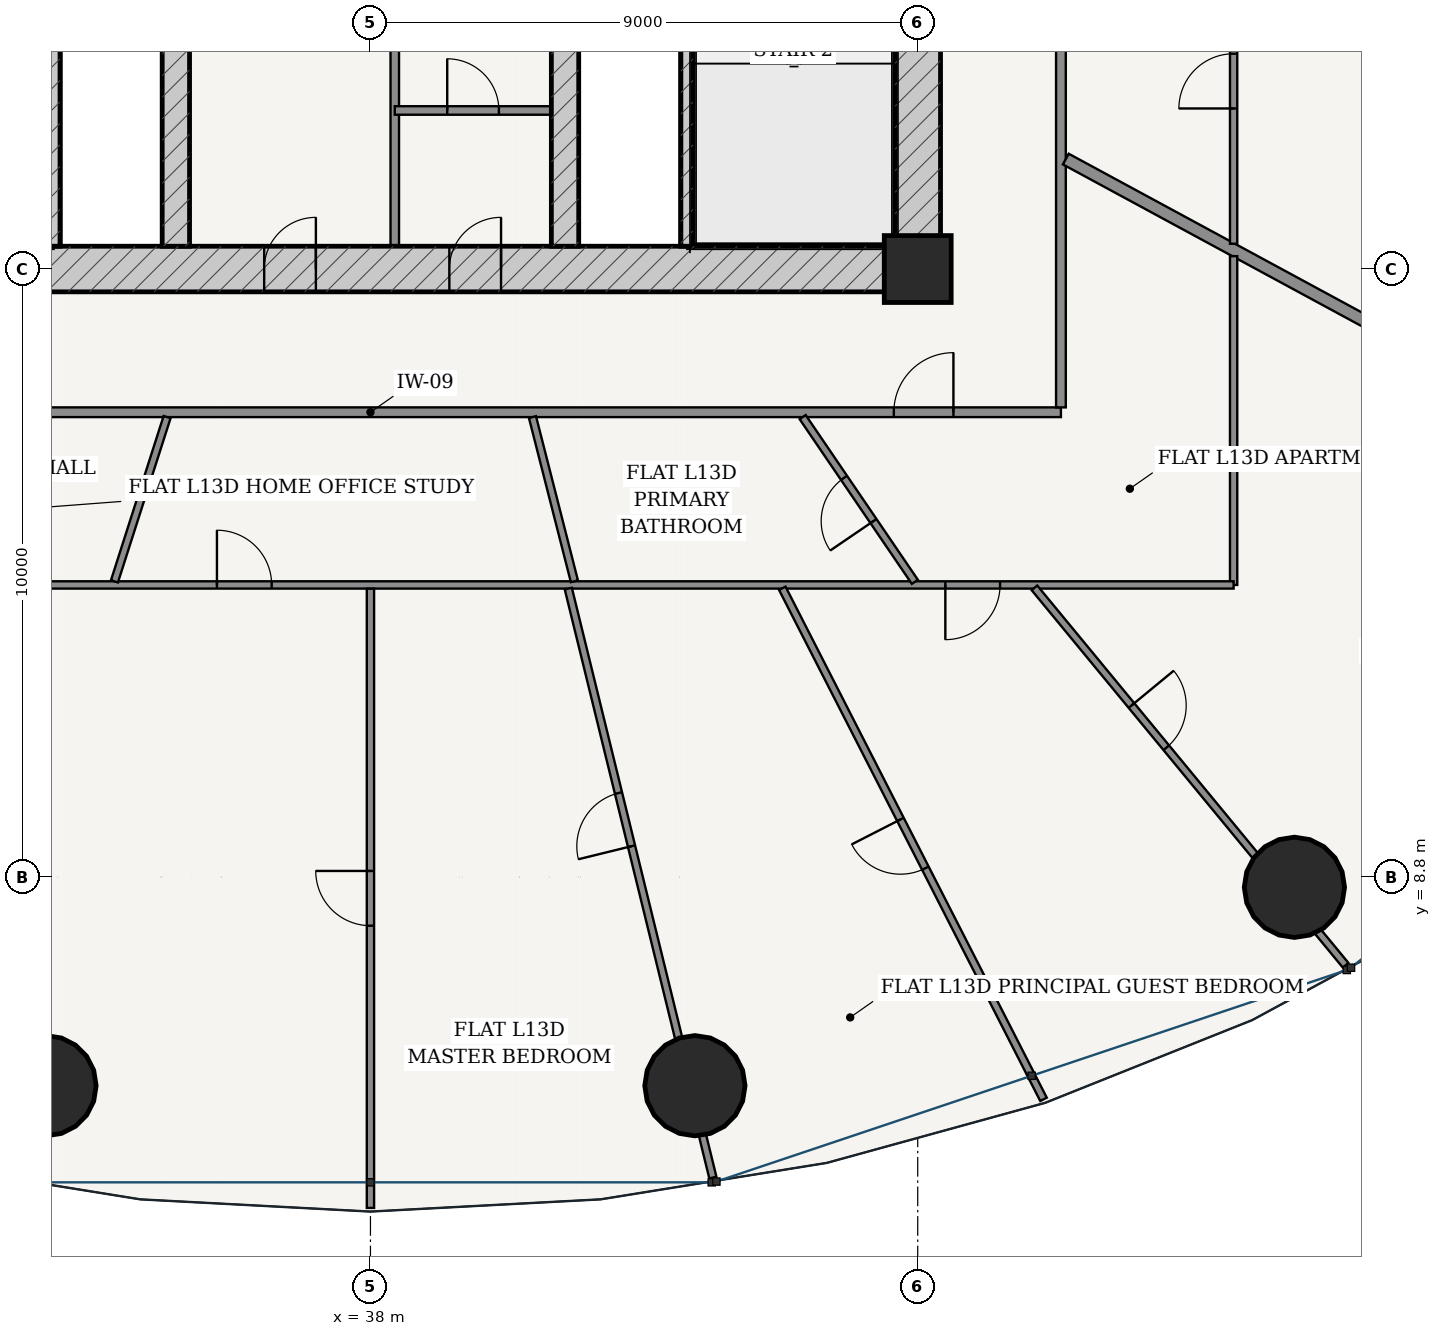
"""IFC4 building model, lengths in metres.
Left out: names, types, materials, properties, quantities, classifications, styles, units other than length and angle.
Written with IfcOpenShell. Run it as: python <this file> out.ifc"""

import sys

from ifc_helpers import new_model, si_unit, direction, frame, frame_2d, origin, origin_2d, place, context, subcontext, project, spatial, rectangle, hollow_circle, extrude, source, transform, mapped, element, fill, save


model = new_model("IFC4")
c1 = context("Model", 3, precision=1e-05, world=origin(), true_north=direction((-0.2419218956, 0.970295726276)))
c2 = subcontext(c1, "Body", "Model", "MODEL_VIEW")
j1 = project(units=[si_unit("LENGTHUNIT", "METRE"), si_unit("PLANEANGLEUNIT", "RADIAN")], contexts=[c1])
p1 = place(None, origin())
s1 = spatial("IfcSite", under=j1, at=p1, CompositionType="ELEMENT")
p2 = place(p1, origin())
s2 = spatial("IfcBuilding", under=s1, at=p2, CompositionType="ELEMENT")
p3 = place(p2, frame((0.0, 0.0, 52.8)))
s3 = spatial("IfcBuildingStorey", under=s2, at=p3, CompositionType="ELEMENT", Elevation=52.8)
p4 = place(p3, frame((47.0, 18.8, 0.0), z_axis=(0.0, 0.0, 1.0), x_axis=(1.0, 0.0, 0.0)))
e1 = element("IfcColumn", 1, at=p4, inside=s3, PredefinedType="COLUMN", context=c2, shape_type="SweptSolid", body=[
    extrude(rectangle(XDim=1.1, YDim=1.1, at=origin_2d()), origin(), (0.0, 0.0, 1.0), 3.6),
])
p5 = place(p3, frame((28.625, 18.8, 0.0), z_axis=(0.0, 0.0, 1.0), x_axis=(1.0, 0.0, 0.0)))
e2 = element("IfcWall", 2, at=p5, inside=s3, PredefinedType="SHEAR", context=c2, shape_type="SweptSolid", body=[
    extrude(rectangle(XDim=18.75, YDim=0.75, at=frame_2d((9.375, 0.0))), origin(), (0.0, 0.0, 1.0), 3.32),
])
p6 = place(p5, frame((7.627, 0.0, 0.0)))
e3 = element("IfcOpeningElement", 3, at=p6, cuts=e2, PredefinedType="OPENING", context=c2, shape_type="SweptSolid", body=[
    extrude(rectangle(XDim=0.85, YDim=2.1, at=frame_2d((0.425, 1.05))), frame((0.0, 0.385, 0.0), z_axis=(0.0, -1.0, 0.0), x_axis=(1.0, 0.0, 0.0)), (0.0, 0.0, 1.0), 0.77),
])
p7 = place(p5, frame((10.673, 0.0, 0.0)))
e4 = element("IfcOpeningElement", 4, at=p7, cuts=e2, PredefinedType="OPENING", context=c2, shape_type="SweptSolid", body=[
    extrude(rectangle(XDim=0.85, YDim=2.1, at=frame_2d((0.425, 1.05))), frame((0.0, 0.385, 0.0), z_axis=(0.0, -1.0, 0.0), x_axis=(1.0, 0.0, 0.0)), (0.0, 0.0, 1.0), 0.77),
])
p8 = place(p3, frame((47.0, 19.175, 0.0), z_axis=(0.0, 0.0, 1.0), x_axis=(0.0, 1.0, 0.0)))
e5 = element("IfcWall", 5, at=p8, inside=s3, PredefinedType="SHEAR", context=c2, shape_type="SweptSolid", body=[
    extrude(rectangle(XDim=15.25, YDim=0.75, at=frame_2d((7.625, 0.0))), origin(), (0.0, 0.0, 1.0), 3.32),
])
p9 = place(p8, frame((9.875, 0.0, 0.0)))
e6 = element("IfcOpeningElement", 6, at=p9, cuts=e5, PredefinedType="OPENING", context=c2, shape_type="SweptSolid", body=[
    extrude(rectangle(XDim=1.5, YDim=2.2, at=frame_2d((0.75, 1.1))), frame((0.0, 0.385, 0.0), z_axis=(0.0, -1.0, 0.0), x_axis=(1.0, 0.0, 0.0)), (0.0, 0.0, 1.0), 0.77),
])
for number, where, z_axis, x_axis in (
    (7, (32.795, 19.175, 0.0), (0.0, 0.0, 1.0), (0.0, 1.0, 0.0)),
    (8, (43.205, 19.175, 0.0), (0.0, 0.0, 1.0), (0.0, 1.0, 0.0)),
):
    element("IfcWall", number, at=place(p3, frame(where, z_axis=z_axis, x_axis=x_axis)), inside=s3, PredefinedType="SOLIDWALL", context=c2, shape_type="SweptSolid", body=[
        extrude(rectangle(XDim=7.375, YDim=0.2, at=frame_2d((3.688, 0.0))), origin(), (0.0, 0.0, 1.0), 3.32),
    ])
p10 = place(p3, frame((34.8, 19.175, 0.0), z_axis=(0.0, 0.0, 1.0), x_axis=(0.0, 1.0, 0.0)))
e9 = element("IfcWall", 9, at=p10, inside=s3, PredefinedType="SHEAR", context=c2, shape_type="SweptSolid", body=[
    extrude(rectangle(XDim=15.25, YDim=0.45, at=frame_2d((7.625, 0.0))), origin(), (0.0, 0.0, 1.0), 3.32),
])
p11 = place(p10, frame((7.8, 0.0, 0.0)))
e10 = element("IfcOpeningElement", 10, at=p11, cuts=e9, PredefinedType="OPENING", context=c2, shape_type="SweptSolid", body=[
    extrude(rectangle(XDim=1.05, YDim=2.15, at=frame_2d((0.525, 1.075))), frame((0.0, 0.235, 0.0), z_axis=(0.0, -1.0, 0.0), x_axis=(1.0, 0.0, 0.0)), (0.0, 0.0, 1.0), 0.47),
])
p12 = place(p3, frame((41.2, 19.175, 0.0), z_axis=(0.0, 0.0, 1.0), x_axis=(0.0, 1.0, 0.0)))
e11 = element("IfcWall", 11, at=p12, inside=s3, PredefinedType="SHEAR", context=c2, shape_type="SweptSolid", body=[
    extrude(rectangle(XDim=15.25, YDim=0.45, at=frame_2d((7.625, 0.0))), origin(), (0.0, 0.0, 1.0), 3.32),
])
p13 = place(p12, frame((7.8, 0.0, 0.0)))
e12 = element("IfcOpeningElement", 12, at=p13, cuts=e11, PredefinedType="OPENING", context=c2, shape_type="SweptSolid", body=[
    extrude(rectangle(XDim=1.05, YDim=2.15, at=frame_2d((0.525, 1.075))), frame((0.0, 0.235, 0.0), z_axis=(0.0, -1.0, 0.0), x_axis=(1.0, 0.0, 0.0)), (0.0, 0.0, 1.0), 0.47),
])
for number, where, z_axis, x_axis in (
    (13, (32.664, 5.37, 0.0), (0.0, 0.0, 1.0), (1.0, 0.0, 0.0)),
    (14, (43.336, 5.37, 0.0), (0.0, 0.0, 1.0), (1.0, 0.0, 0.0)),
    (15, (53.195, 8.632, 0.0), (0.0, 0.0, 1.0), (1.0, 0.0, 0.0)),
):
    element("IfcColumn", number, at=place(p3, frame(where, z_axis=z_axis, x_axis=x_axis)), inside=s3, PredefinedType="COLUMN", context=c2, shape_type="SweptSolid", body=[
        extrude(hollow_circle(Radius=0.825, WallThickness=0.05, at=origin_2d()), origin(), (0.0, 0.0, 1.0), 3.6),
    ])
p14 = place(p3, frame((38.4, 19.175, 0.0), z_axis=(0.0, 0.0, 1.0), x_axis=(0.0, 1.0, 0.0)))
e16 = element("IfcWall", 16, at=p14, inside=s3, PredefinedType="PARTITIONING", context=c2, shape_type="SweptSolid", body=[
    extrude(rectangle(XDim=4.465, YDim=0.14, at=frame_2d((2.232, 0.0))), origin(), (0.0, 0.0, 1.0), 3.32),
])
p15 = place(p3, frame((38.4, 21.407, 0.0), z_axis=(0.0, 0.0, 1.0), x_axis=(1.0, 0.0, 0.0)))
e17 = element("IfcWall", 17, at=p15, inside=s3, PredefinedType="PARTITIONING", context=c2, shape_type="SweptSolid", body=[
    extrude(rectangle(XDim=2.575, YDim=0.14, at=frame_2d((1.288, 0.0))), origin(), (0.0, 0.0, 1.0), 3.32),
])
p16 = place(p15, frame((0.863, 0.0, 0.0)))
e18 = element("IfcOpeningElement", 18, at=p16, cuts=e17, PredefinedType="OPENING", context=c2, shape_type="SweptSolid", body=[
    extrude(rectangle(XDim=0.85, YDim=2.1, at=frame_2d((0.425, 1.05))), frame((0.0, 0.08, 0.0), z_axis=(0.0, -1.0, 0.0), x_axis=(1.0, 0.0, 0.0)), (0.0, 0.0, 1.0), 0.16),
])
p17 = place(p3, frame((26.645, 16.445, 0.0), z_axis=(0.0, 0.0, 1.0), x_axis=(1.0, 0.0, 0.0)))
e19 = element("IfcWall", 19, at=p17, inside=s3, PredefinedType="PARTITIONING", context=c2, shape_type="SweptSolid", body=[
    extrude(rectangle(XDim=22.71, YDim=0.16, at=frame_2d((11.355, 0.0))), origin(), (0.0, 0.0, 1.0), 2.688),
])
p18 = place(p17, frame((19.962, 0.0, 0.0)))
e20 = element("IfcOpeningElement", 20, at=p18, cuts=e19, PredefinedType="OPENING", context=c2, shape_type="SweptSolid", body=[
    extrude(rectangle(XDim=0.98, YDim=2.2, at=frame_2d((0.49, 1.1))), frame((0.0, 0.09, 0.0), z_axis=(0.0, -1.0, 0.0), x_axis=(1.0, 0.0, 0.0)), (0.0, 0.0, 1.0), 0.18),
])
p19 = place(p3, frame((49.355, 16.525, 0.0), z_axis=(0.0, 0.0, 1.0), x_axis=(0.0, 1.0, 0.0)))
e21 = element("IfcWall", 21, at=p19, inside=s3, PredefinedType="PARTITIONING", context=c2, shape_type="SweptSolid", body=[
    extrude(rectangle(XDim=20.55, YDim=0.16, at=frame_2d((10.275, 0.0))), origin(), (0.0, 0.0, 1.0), 2.688),
])
p20 = place(p3, frame((49.435, 20.608, 0.0), z_axis=(0.0, 0.0, 1.0), x_axis=(0.879369737803, -0.476139542819, 0.0)))
e22 = element("IfcWall", 22, at=p20, inside=s3, PredefinedType="PARTITIONING", context=c2, shape_type="SweptSolid", body=[
    extrude(rectangle(XDim=14.295, YDim=0.2, at=frame_2d((7.147, 0.0))), origin(), (0.0, 0.0, 1.0), 2.688),
])
p21 = place(p3, frame((52.195, 39.995, 0.0), z_axis=(0.0, 0.0, 1.0), x_axis=(0.0, -1.0, 0.0)))
e23 = element("IfcWall", 23, at=p21, inside=s3, PredefinedType="PARTITIONING", context=c2, shape_type="SweptSolid", body=[
    extrude(rectangle(XDim=20.779, YDim=0.12, at=frame_2d((10.39, 0.0))), origin(), (0.0, 0.0, 1.0), 2.688),
])
p22 = place(p21, frame((13.944, 0.0, 0.0)))
e24 = element("IfcOpeningElement", 24, at=p22, cuts=e23, PredefinedType="OPENING", context=c2, shape_type="SweptSolid", body=[
    extrude(rectangle(XDim=0.9, YDim=2.15, at=frame_2d((0.45, 1.075))), frame((0.0, 0.07, 0.0), z_axis=(0.0, -1.0, 0.0), x_axis=(1.0, 0.0, 0.0)), (0.0, 0.0, 1.0), 0.14),
])
p23 = place(p21, frame((17.655, 0.0, 0.0)))
e25 = element("IfcOpeningElement", 25, at=p23, cuts=e23, PredefinedType="OPENING", context=c2, shape_type="SweptSolid", body=[
    extrude(rectangle(XDim=0.9, YDim=2.15, at=frame_2d((0.45, 1.075))), frame((0.0, 0.07, 0.0), z_axis=(0.0, -1.0, 0.0), x_axis=(1.0, 0.0, 0.0)), (0.0, 0.0, 1.0), 0.14),
])
p24 = place(p3, frame((52.195, 19.012, 0.0), z_axis=(0.0, 0.0, 1.0), x_axis=(0.0, -1.0, 0.0)))
e26 = element("IfcWall", 26, at=p24, inside=s3, PredefinedType="PARTITIONING", context=c2, shape_type="SweptSolid", body=[
    extrude(rectangle(XDim=5.407, YDim=0.12, at=frame_2d((2.704, 0.0))), origin(), (0.0, 0.0, 1.0), 2.999),
])
p25 = place(p3, frame((52.195, 13.605, 0.0), z_axis=(0.0, 0.0, 1.0), x_axis=(-1.0, 0.0, 0.0)))
e27 = element("IfcWall", 27, at=p25, inside=s3, PredefinedType="PARTITIONING", context=c2, shape_type="SweptSolid", body=[
    extrude(rectangle(XDim=24.973, YDim=0.12, at=frame_2d((12.487, 0.0))), origin(), (0.0, 0.0, 1.0), 2.688),
])
p26 = place(p25, frame((3.841, 0.0, 0.0)))
e28 = element("IfcOpeningElement", 28, at=p26, cuts=e27, PredefinedType="OPENING", context=c2, shape_type="SweptSolid", body=[
    extrude(rectangle(XDim=0.9, YDim=2.15, at=frame_2d((0.45, 1.075))), frame((0.0, 0.07, 0.0), z_axis=(0.0, -1.0, 0.0), x_axis=(1.0, 0.0, 0.0)), (0.0, 0.0, 1.0), 0.14),
])
p27 = place(p25, frame((15.819, 0.0, 0.0)))
e29 = element("IfcOpeningElement", 29, at=p27, cuts=e27, PredefinedType="OPENING", context=c2, shape_type="SweptSolid", body=[
    extrude(rectangle(XDim=0.9, YDim=2.15, at=frame_2d((0.45, 1.075))), frame((0.0, 0.07, 0.0), z_axis=(0.0, -1.0, 0.0), x_axis=(1.0, 0.0, 0.0)), (0.0, 0.0, 1.0), 0.14),
])
p28 = place(p25, frame((21.123, 0.0, 0.0)))
e30 = element("IfcOpeningElement", 30, at=p28, cuts=e27, PredefinedType="OPENING", context=c2, shape_type="SweptSolid", body=[
    extrude(rectangle(XDim=0.9, YDim=2.15, at=frame_2d((0.45, 1.075))), frame((0.0, 0.07, 0.0), z_axis=(0.0, -1.0, 0.0), x_axis=(1.0, 0.0, 0.0)), (0.0, 0.0, 1.0), 0.14),
])
p29 = place(p3, frame((38.0, 13.543, 0.0), z_axis=(0.0, 0.0, 1.0), x_axis=(0.0, -1.0, 0.0)))
e31 = element("IfcWall", 31, at=p29, inside=s3, PredefinedType="PARTITIONING", context=c2, shape_type="SweptSolid", body=[
    extrude(rectangle(XDim=10.183, YDim=0.12, at=frame_2d((5.091, 0.0))), origin(), (0.0, 0.0, 1.0), 2.762),
])
p30 = place(p29, frame((4.642, 0.0, 0.0)))
e32 = element("IfcOpeningElement", 32, at=p30, cuts=e31, PredefinedType="OPENING", context=c2, shape_type="SweptSolid", body=[
    extrude(rectangle(XDim=0.9, YDim=2.15, at=frame_2d((0.45, 1.075))), frame((0.0, 0.07, 0.0), z_axis=(0.0, -1.0, 0.0), x_axis=(1.0, 0.0, 0.0)), (0.0, 0.0, 1.0), 0.14),
])
p31 = place(p3, frame((41.254, 13.545, 0.0), z_axis=(0.0, 0.0, 1.0), x_axis=(0.238391877067, -0.971169044476, 0.0)))
e33 = element("IfcWall", 33, at=p31, inside=s3, PredefinedType="PARTITIONING", context=c2, shape_type="SweptSolid", body=[
    extrude(rectangle(XDim=9.973, YDim=0.12, at=frame_2d((4.986, 0.0))), origin(), (0.0, 0.0, 1.0), 2.688),
])
p32 = place(p31, frame((3.462, 0.0, 0.0)))
e34 = element("IfcOpeningElement", 34, at=p32, cuts=e33, PredefinedType="OPENING", context=c2, shape_type="SweptSolid", body=[
    extrude(rectangle(XDim=0.9, YDim=2.15, at=frame_2d((0.45, 1.075))), frame((0.0, 0.07, 0.0), z_axis=(0.0, -1.0, 0.0), x_axis=(1.0, 0.0, 0.0)), (0.0, 0.0, 1.0), 0.14),
])
p33 = place(p3, frame((44.773, 13.55, 0.0), z_axis=(0.0, 0.0, 1.0), x_axis=(0.455131567849, -0.890424200001, 0.0)))
e35 = element("IfcWall", 35, at=p33, inside=s3, PredefinedType="PARTITIONING", context=c2, shape_type="SweptSolid", body=[
    extrude(rectangle(XDim=9.439, YDim=0.12, at=frame_2d((4.719, 0.0))), origin(), (0.0, 0.0, 1.0), 2.762),
])
p34 = place(p33, frame((4.269, 0.0, 0.0)))
e36 = element("IfcOpeningElement", 36, at=p34, cuts=e35, PredefinedType="OPENING", context=c2, shape_type="SweptSolid", body=[
    extrude(rectangle(XDim=0.9, YDim=2.15, at=frame_2d((0.45, 1.075))), frame((0.0, 0.07, 0.0), z_axis=(0.0, -1.0, 0.0), x_axis=(1.0, 0.0, 0.0)), (0.0, 0.0, 1.0), 0.14),
])
p35 = place(p3, frame((48.919, 13.557, 0.0), z_axis=(0.0, 0.0, 1.0), x_axis=(0.636193310573, -0.771529695852, 0.0)))
e37 = element("IfcWall", 37, at=p35, inside=s3, PredefinedType="PARTITIONING", context=c2, shape_type="SweptSolid", body=[
    extrude(rectangle(XDim=8.044, YDim=0.12, at=frame_2d((4.022, 0.0))), origin(), (0.0, 0.0, 1.0), 2.688),
])
p36 = place(p35, frame((2.508, 0.0, 0.0)))
e38 = element("IfcOpeningElement", 38, at=p36, cuts=e37, PredefinedType="OPENING", context=c2, shape_type="SweptSolid", body=[
    extrude(rectangle(XDim=0.9, YDim=2.15, at=frame_2d((0.45, 1.075))), frame((0.0, 0.07, 0.0), z_axis=(0.0, -1.0, 0.0), x_axis=(1.0, 0.0, 0.0)), (0.0, 0.0, 1.0), 0.14),
])
p37 = place(p3, frame((34.656, 16.365, 0.0), z_axis=(0.0, 0.0, 1.0), x_axis=(-0.305153630579, -0.952303135427, 0.0)))
e39 = element("IfcWall", 39, at=p37, inside=s3, PredefinedType="PARTITIONING", context=c2, shape_type="SweptSolid", body=[
    extrude(rectangle(XDim=2.836, YDim=0.12, at=frame_2d((1.418, 0.0))), origin(), (0.0, 0.0, 1.0), 3.32),
])
p38 = place(p3, frame((40.665, 16.365, 0.0), z_axis=(0.0, 0.0, 1.0), x_axis=(0.2474182455, -0.968908773721, 0.0)))
e40 = element("IfcWall", 40, at=p38, inside=s3, PredefinedType="PARTITIONING", context=c2, shape_type="SweptSolid", body=[
    extrude(rectangle(XDim=2.787, YDim=0.12, at=frame_2d((1.393, 0.0))), origin(), (0.0, 0.0, 1.0), 2.688),
])
p39 = place(p3, frame((45.108, 16.365, 0.0), z_axis=(0.0, 0.0, 1.0), x_axis=(0.562992379509, -0.826462086617, 0.0)))
e41 = element("IfcWall", 41, at=p39, inside=s3, PredefinedType="PARTITIONING", context=c2, shape_type="SweptSolid", body=[
    extrude(rectangle(XDim=3.278, YDim=0.12, at=frame_2d((1.639, 0.0))), origin(), (0.0, 0.0, 1.0), 3.32),
])
p40 = place(p39, frame((1.209, 0.0, 0.0)))
e42 = element("IfcOpeningElement", 42, at=p40, cuts=e41, PredefinedType="OPENING", context=c2, shape_type="SweptSolid", body=[
    extrude(rectangle(XDim=0.86, YDim=2.15, at=frame_2d((0.43, 1.075))), frame((0.0, 0.07, 0.0), z_axis=(0.0, -1.0, 0.0), x_axis=(1.0, 0.0, 0.0)), (0.0, 0.0, 1.0), 0.14),
])
m1 = source(origin(), c2, "Body", "SweptSolid", [
    extrude(rectangle(XDim=0.85, YDim=2.1, at=frame_2d((0.425, 1.05))), frame((0.0, 0.025, 0.0), z_axis=(0.0, -1.0, 0.0), x_axis=(1.0, 0.0, 0.0)), (0.0, 0.0, 1.0), 0.05),
])
p41 = place(p6, origin())
e43 = element("IfcDoor", 43, at=p41, inside=s3, OperationType="SINGLE_SWING_RIGHT", PredefinedType="DOOR", context=c2, shape_type="MappedRepresentation", body=[
    mapped(m1, transform((0.0, 0.0, 0.0), scale=1.0)),
])
fill(e3, e43)
p42 = place(p7, origin())
e44 = element("IfcDoor", 44, at=p42, inside=s3, OperationType="SINGLE_SWING_RIGHT", PredefinedType="DOOR", context=c2, shape_type="MappedRepresentation", body=[
    mapped(m1, transform((0.0, 0.0, 0.0), scale=1.0)),
])
fill(e4, e44)
p43 = place(p16, origin())
e45 = element("IfcDoor", 45, at=p43, inside=s3, OperationType="SINGLE_SWING_LEFT", PredefinedType="DOOR", context=c2, shape_type="MappedRepresentation", body=[
    mapped(m1, transform((0.0, 0.0, 0.0), scale=1.0)),
])
fill(e18, e45)
m2 = source(origin(), c2, "Body", "SweptSolid", [
    extrude(rectangle(XDim=0.9, YDim=2.15, at=frame_2d((0.45, 1.075))), frame((0.0, 0.025, 0.0), z_axis=(0.0, -1.0, 0.0), x_axis=(1.0, 0.0, 0.0)), (0.0, 0.0, 1.0), 0.05),
])
p44 = place(p23, frame((0.9, 0.0, 0.0), z_axis=(0.0, 0.0, 1.0), x_axis=(-1.0, 0.0, 0.0)))
e46 = element("IfcDoor", 46, at=p44, inside=s3, OperationType="SINGLE_SWING_LEFT", PredefinedType="DOOR", context=c2, shape_type="MappedRepresentation", body=[
    mapped(m2, transform((0.0, 0.0, 0.0), scale=1.0)),
])
fill(e25, e46)
m3 = source(origin(), c2, "Body", "SweptSolid", [
    extrude(rectangle(XDim=0.98, YDim=2.2, at=frame_2d((0.49, 1.1))), frame((0.0, 0.025, 0.0), z_axis=(0.0, -1.0, 0.0), x_axis=(1.0, 0.0, 0.0)), (0.0, 0.0, 1.0), 0.05),
])
p45 = place(p18, origin())
e47 = element("IfcDoor", 47, at=p45, inside=s3, OperationType="SINGLE_SWING_RIGHT", PredefinedType="DOOR", context=c2, shape_type="MappedRepresentation", body=[
    mapped(m3, transform((0.0, 0.0, 0.0), scale=1.0)),
])
fill(e20, e47)
m4 = source(origin(), c2, "Body", "SweptSolid", [
    extrude(rectangle(XDim=0.86, YDim=2.15, at=frame_2d((0.43, 1.075))), frame((0.0, 0.025, 0.0), z_axis=(0.0, -1.0, 0.0), x_axis=(1.0, 0.0, 0.0)), (0.0, 0.0, 1.0), 0.05),
])
p46 = place(p40, frame((0.86, 0.0, 0.0), z_axis=(0.0, 0.0, 1.0), x_axis=(-1.0, 0.0, 0.0)))
e48 = element("IfcDoor", 48, at=p46, inside=s3, OperationType="SINGLE_SWING_LEFT", PredefinedType="DOOR", context=c2, shape_type="MappedRepresentation", body=[
    mapped(m4, transform((0.0, 0.0, 0.0), scale=1.0)),
])
fill(e42, e48)
p47 = place(p26, origin())
e49 = element("IfcDoor", 49, at=p47, inside=s3, OperationType="SINGLE_SWING_RIGHT", PredefinedType="DOOR", context=c2, shape_type="MappedRepresentation", body=[
    mapped(m2, transform((0.0, 0.0, 0.0), scale=1.0)),
])
fill(e28, e49)
p48 = place(p36, origin())
e50 = element("IfcDoor", 50, at=p48, inside=s3, OperationType="SINGLE_SWING_LEFT", PredefinedType="DOOR", context=c2, shape_type="MappedRepresentation", body=[
    mapped(m2, transform((0.0, 0.0, 0.0), scale=1.0)),
])
fill(e38, e50)
p49 = place(p34, frame((0.9, 0.0, 0.0), z_axis=(0.0, 0.0, 1.0), x_axis=(-1.0, 0.0, 0.0)))
e51 = element("IfcDoor", 51, at=p49, inside=s3, OperationType="SINGLE_SWING_RIGHT", PredefinedType="DOOR", context=c2, shape_type="MappedRepresentation", body=[
    mapped(m2, transform((0.0, 0.0, 0.0), scale=1.0)),
])
fill(e36, e51)
p50 = place(p32, frame((0.9, 0.0, 0.0), z_axis=(0.0, 0.0, 1.0), x_axis=(-1.0, 0.0, 0.0)))
e52 = element("IfcDoor", 52, at=p50, inside=s3, OperationType="SINGLE_SWING_LEFT", PredefinedType="DOOR", context=c2, shape_type="MappedRepresentation", body=[
    mapped(m2, transform((0.0, 0.0, 0.0), scale=1.0)),
])
fill(e34, e52)
p51 = place(p30, frame((0.9, 0.0, 0.0), z_axis=(0.0, 0.0, 1.0), x_axis=(-1.0, 0.0, 0.0)))
e53 = element("IfcDoor", 53, at=p51, inside=s3, OperationType="SINGLE_SWING_RIGHT", PredefinedType="DOOR", context=c2, shape_type="MappedRepresentation", body=[
    mapped(m2, transform((0.0, 0.0, 0.0), scale=1.0)),
])
fill(e32, e53)
p52 = place(p27, frame((0.9, 0.0, 0.0), z_axis=(0.0, 0.0, 1.0), x_axis=(-1.0, 0.0, 0.0)))
e54 = element("IfcDoor", 54, at=p52, inside=s3, OperationType="SINGLE_SWING_LEFT", PredefinedType="DOOR", context=c2, shape_type="MappedRepresentation", body=[
    mapped(m2, transform((0.0, 0.0, 0.0), scale=1.0)),
])
fill(e29, e54)
save(model, sys.argv[1])
